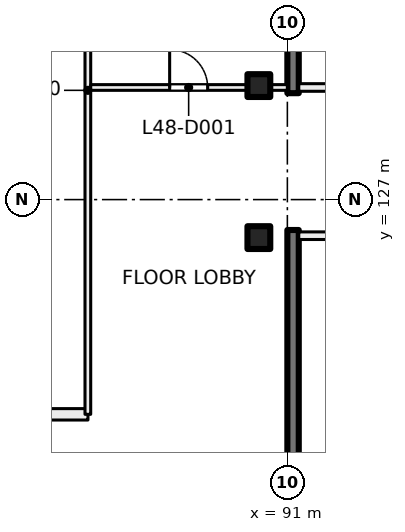
"""IFC4 building model, lengths in metres.
Left out: names, types, materials, properties, quantities, classifications, styles, units other than length and angle.
Written with IfcOpenShell. Run it as: python <this file> out.ifc"""

import sys

from ifc_helpers import new_model, si_unit, direction, frame, frame_2d, origin, origin_2d, place, context, subcontext, project, spatial, rectangle, extrude, element, fill, save


model = new_model("IFC4")
c1 = context("Model", 3, precision=1e-05, world=origin(), true_north=direction((0.0, 1.0)))
c2 = subcontext(c1, "Body", "Model", "MODEL_VIEW")
j1 = project(units=[si_unit("LENGTHUNIT", "METRE"), si_unit("PLANEANGLEUNIT", "RADIAN")], contexts=[c1])
p1 = place(None, origin())
s1 = spatial("IfcSite", under=j1, at=p1, CompositionType="ELEMENT")
p2 = place(p1, origin())
s2 = spatial("IfcBuilding", under=s1, at=p2, CompositionType="ELEMENT")
p3 = place(p2, frame((0.0, 0.0, 204.0)))
s3 = spatial("IfcBuildingStorey", under=s2, at=p3, CompositionType="ELEMENT", Elevation=204.0)
for number, where, z_axis, x_axis in (
    (1, (90.25, 130.0, 0.0), (0.0, 0.0, 1.0), (1.0, 0.0, 0.0)),
    (2, (90.25, 126.0, 0.0), (0.0, 0.0, 1.0), (1.0, 0.0, 0.0)),
):
    element("IfcColumn", number, at=place(p3, frame(where, z_axis=z_axis, x_axis=x_axis)), inside=s3, PredefinedType="COLUMN", context=c2, shape_type="SweptSolid", body=[
        extrude(rectangle(XDim=0.6, YDim=0.6, at=origin_2d()), origin(), (0.0, 0.0, 1.0), 4.0),
    ])
for number, where, z_axis, x_axis in (
    (3, (91.15, 138.5, 0.0), (0.0, 0.0, 1.0), (0.0, -1.0, 0.0)),
    (4, (91.15, 126.2, 0.0), (0.0, 0.0, 1.0), (0.0, -1.0, 0.0)),
):
    element("IfcWall", number, at=place(p3, frame(where, z_axis=z_axis, x_axis=x_axis)), inside=s3, PredefinedType="SHEAR", context=c2, shape_type="SweptSolid", body=[
        extrude(rectangle(XDim=8.7, YDim=0.3, at=frame_2d((4.35, 0.0))), origin(), (0.0, 0.0, 1.0), 4.0),
    ])
p4 = place(p3, frame((95.25, 126.05, 0.0), z_axis=(0.0, 0.0, 1.0), x_axis=(-1.0, 0.0, 0.0)))
e5 = element("IfcWall", 5, at=p4, inside=s3, PredefinedType="PARTITIONING", context=c2, shape_type="SweptSolid", body=[
    extrude(rectangle(XDim=3.95, YDim=0.2, at=frame_2d((1.975, 0.0))), origin(), (0.0, 0.0, 1.0), 3.625),
])
p5 = place(p4, frame((0.3, 0.0, 0.0)))
e6 = element("IfcOpeningElement", 6, at=p5, cuts=e5, PredefinedType="OPENING", context=c2, shape_type="SweptSolid", body=[
    extrude(rectangle(XDim=1.2, YDim=2.1, at=frame_2d((0.6, 1.05))), frame((0.0, 0.11, 0.0), z_axis=(0.0, -1.0, 0.0), x_axis=(1.0, 0.0, 0.0)), (0.0, 0.0, 1.0), 0.22),
])
p6 = place(p3, frame((91.3, 129.95, 0.0), z_axis=(0.0, 0.0, 1.0), x_axis=(1.0, 0.0, 0.0)))
e7 = element("IfcWall", 7, at=p6, inside=s3, PredefinedType="PARTITIONING", context=c2, shape_type="SweptSolid", body=[
    extrude(rectangle(XDim=3.95, YDim=0.2, at=frame_2d((1.975, 0.0))), origin(), (0.0, 0.0, 1.0), 3.625),
])
p7 = place(p6, frame((2.45, 0.0, 0.0)))
e8 = element("IfcOpeningElement", 8, at=p7, cuts=e7, PredefinedType="OPENING", context=c2, shape_type="SweptSolid", body=[
    extrude(rectangle(XDim=1.2, YDim=2.1, at=frame_2d((0.6, 1.05))), frame((0.0, 0.11, 0.0), z_axis=(0.0, -1.0, 0.0), x_axis=(1.0, 0.0, 0.0)), (0.0, 0.0, 1.0), 0.22),
])
p8 = place(p3, frame((50.657, 121.35, 0.0), z_axis=(0.0, 0.0, 1.0), x_axis=(1.0, 0.0, 0.0)))
e9 = element("IfcWall", 9, at=p8, inside=s3, PredefinedType="PARTITIONING", context=c2, shape_type="SweptSolid", body=[
    extrude(rectangle(XDim=35.096, YDim=0.3, at=frame_2d((17.548, 0.0))), origin(), (0.0, 0.0, 1.0), 3.625),
])
p9 = place(p8, frame((21.093, 0.0, 0.0)))
e10 = element("IfcOpeningElement", 10, at=p9, cuts=e9, PredefinedType="OPENING", context=c2, shape_type="SweptSolid", body=[
    extrude(rectangle(XDim=1.0, YDim=2.1, at=frame_2d((0.5, 1.05))), frame((0.0, 0.16, 0.0), z_axis=(0.0, -1.0, 0.0), x_axis=(1.0, 0.0, 0.0)), (0.0, 0.0, 1.0), 0.32),
])
p10 = place(p8, frame((29.693, 0.0, 0.0)))
e11 = element("IfcOpeningElement", 11, at=p10, cuts=e9, PredefinedType="OPENING", context=c2, shape_type="SweptSolid", body=[
    extrude(rectangle(XDim=1.8, YDim=2.1, at=frame_2d((0.9, 1.05))), frame((0.0, 0.16, 0.0), z_axis=(0.0, -1.0, 0.0), x_axis=(1.0, 0.0, 0.0)), (0.0, 0.0, 1.0), 0.32),
])
p11 = place(p8, frame((9.443, 0.0, 0.0)))
e12 = element("IfcOpeningElement", 12, at=p11, cuts=e9, PredefinedType="OPENING", context=c2, shape_type="SweptSolid", body=[
    extrude(rectangle(XDim=1.8, YDim=2.1, at=frame_2d((0.9, 1.05))), frame((0.0, 0.16, 0.0), z_axis=(0.0, -1.0, 0.0), x_axis=(1.0, 0.0, 0.0)), (0.0, 0.0, 1.0), 0.32),
])
p12 = place(p8, frame((0.896, 0.0, 0.0)))
e13 = element("IfcOpeningElement", 13, at=p12, cuts=e9, PredefinedType="OPENING", context=c2, shape_type="SweptSolid", body=[
    extrude(rectangle(XDim=1.8, YDim=2.1, at=frame_2d((0.9, 1.05))), frame((0.0, 0.16, 0.0), z_axis=(0.0, -1.0, 0.0), x_axis=(1.0, 0.0, 0.0)), (0.0, 0.0, 1.0), 0.32),
])
p13 = place(p3, frame((85.75, 121.35, 0.0), z_axis=(0.0, 0.0, 1.0), x_axis=(0.0, 1.0, 0.0)))
e14 = element("IfcWall", 14, at=p13, inside=s3, PredefinedType="PARTITIONING", context=c2, shape_type="SweptSolid", body=[
    extrude(rectangle(XDim=17.05, YDim=0.15, at=frame_2d((8.525, 0.0))), origin(), (0.0, 0.0, 1.0), 3.625),
])
p14 = place(p3, frame((85.825, 129.95, 0.0), z_axis=(0.0, 0.0, 1.0), x_axis=(1.0, 0.0, 0.0)))
e15 = element("IfcWall", 15, at=p14, inside=s3, PredefinedType="PARTITIONING", context=c2, shape_type="SweptSolid", body=[
    extrude(rectangle(XDim=5.175, YDim=0.15, at=frame_2d((2.587, 0.0))), origin(), (0.0, 0.0, 1.0), 3.625),
])
p15 = place(p14, frame((2.077, 0.0, 0.0)))
e16 = element("IfcOpeningElement", 16, at=p15, cuts=e15, PredefinedType="OPENING", context=c2, shape_type="SweptSolid", body=[
    extrude(rectangle(XDim=1.0, YDim=2.1, at=frame_2d((0.5, 1.05))), frame((0.0, 0.085, 0.0), z_axis=(0.0, -1.0, 0.0), x_axis=(1.0, 0.0, 0.0)), (0.0, 0.0, 1.0), 0.17),
])
p16 = place(p15, origin())
e17 = element("IfcDoor", 17, at=p16, inside=s3, OperationType="SINGLE_SWING_LEFT", PredefinedType="DOOR", context=c2, shape_type="SweptSolid", body=[
    extrude(rectangle(XDim=1.0, YDim=2.1, at=frame_2d((0.5, 1.05))), frame((0.0, 0.025, 0.0), z_axis=(0.0, -1.0, 0.0), x_axis=(1.0, 0.0, 0.0)), (0.0, 0.0, 1.0), 0.05),
])
fill(e16, e17)
save(model, sys.argv[1])
